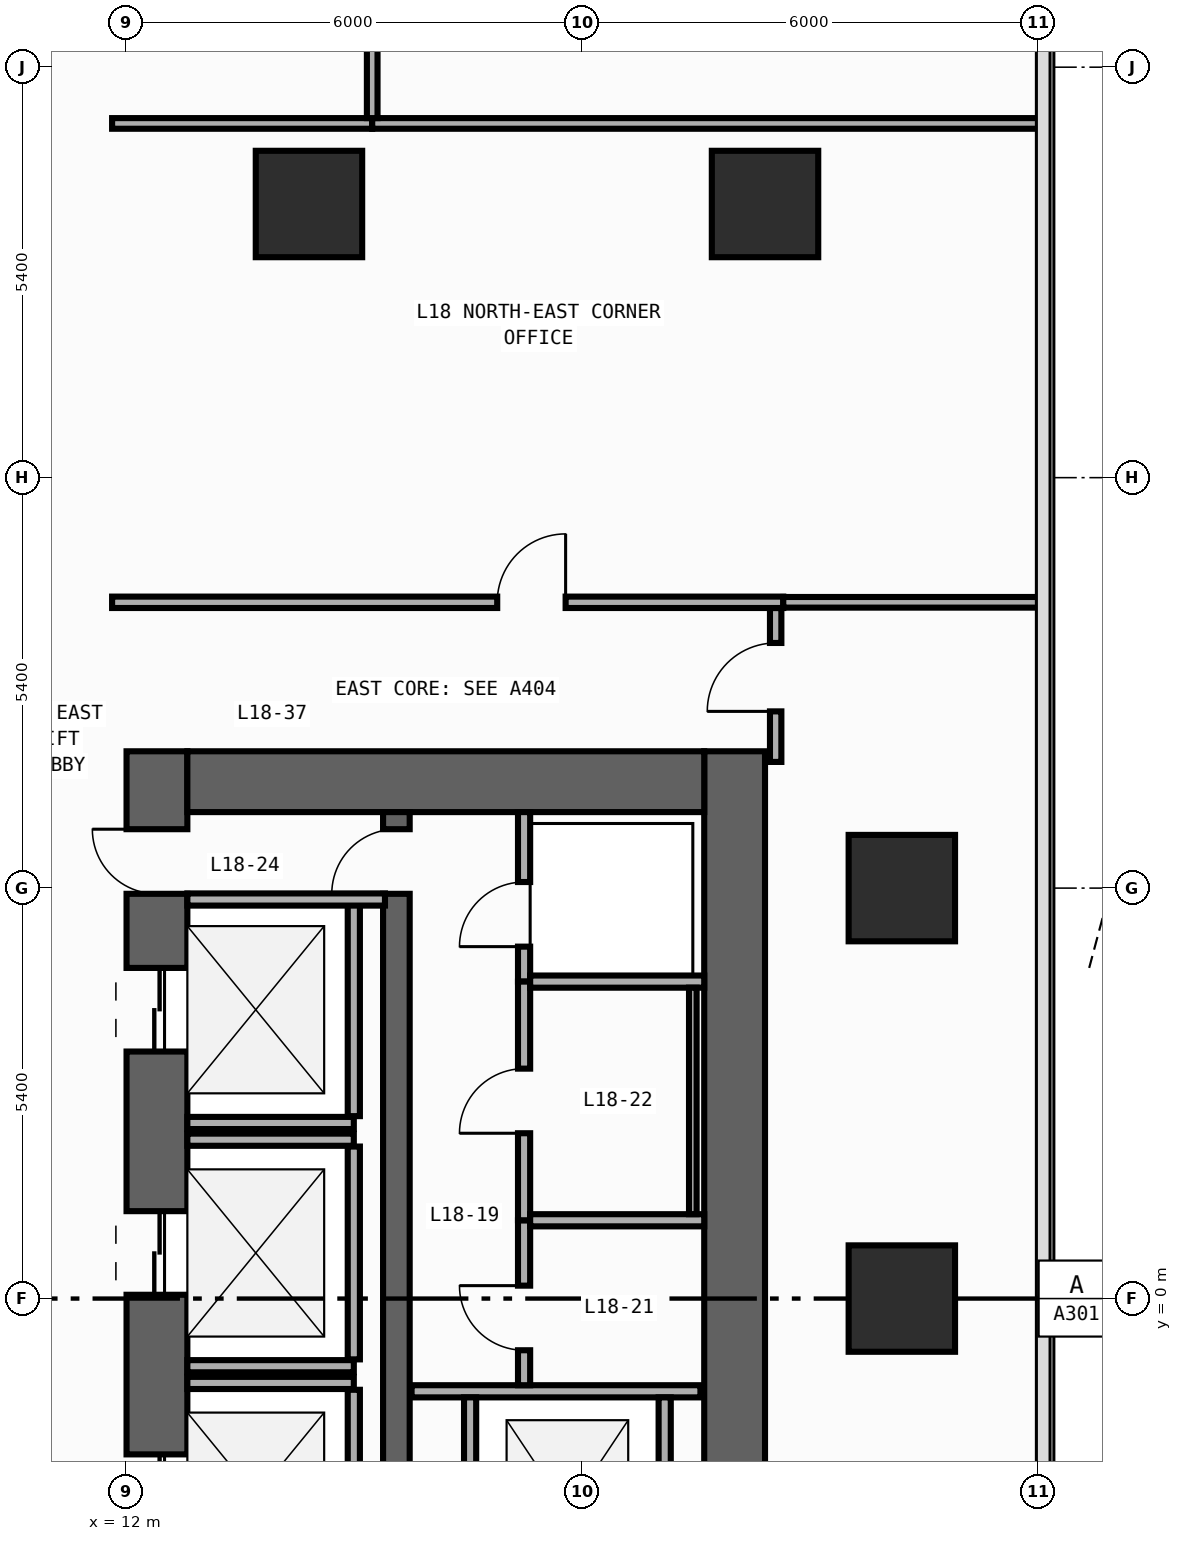
"""IFC4 building model, lengths in metres.
Left out: names, types, materials, properties, quantities, classifications, styles, units other than length and angle.
Written with IfcOpenShell. Run it as: python <this file> out.ifc"""

import sys

from ifc_helpers import new_model, si_unit, direction, frame, frame_2d, origin, origin_2d, place, context, subcontext, project, spatial, rectangle, extrude, element, fill, save


model = new_model("IFC4")
c1 = context("Model", 3, precision=1e-05, world=origin(), true_north=direction((0.0, 1.0)))
c2 = subcontext(c1, "Body", "Model", "MODEL_VIEW")
j1 = project(units=[si_unit("LENGTHUNIT", "METRE"), si_unit("PLANEANGLEUNIT", "RADIAN")], contexts=[c1])
p1 = place(None, origin())
s1 = spatial("IfcSite", under=j1, at=p1, CompositionType="ELEMENT")
p2 = place(p1, origin())
s2 = spatial("IfcBuilding", under=s1, at=p2, CompositionType="ELEMENT")
p3 = place(p2, frame((0.0, 0.0, 76.4)))
s3 = spatial("IfcBuildingStorey", under=s2, at=p3, CompositionType="ELEMENT", Elevation=76.4)
p4 = place(p3, frame((12.4, -19.8, 0.0), z_axis=(0.0, 0.0, 1.0), x_axis=(0.0, 1.0, 0.0)))
e1 = element("IfcWall", 1, at=p4, inside=s3, PredefinedType="SHEAR", context=c2, shape_type="SweptSolid", body=[
    extrude(rectangle(XDim=27.0, YDim=0.8, at=frame_2d((13.5, 0.0))), origin(), (0.0, 0.0, 1.0), 3.94),
])
p5 = place(p4, frame((23.05, 0.0, 0.0)))
e2 = element("IfcOpeningElement", 2, at=p5, cuts=e1, PredefinedType="OPENING", context=c2, shape_type="SweptSolid", body=[
    extrude(rectangle(XDim=1.1, YDim=2.2, at=frame_2d((0.55, 1.1))), frame((0.0, 0.41, 0.0), z_axis=(0.0, -1.0, 0.0), x_axis=(1.0, 0.0, 0.0)), (0.0, 0.0, 1.0), 0.82),
])
p6 = place(p4, frame((19.85, 0.0, 0.0)))
e3 = element("IfcOpeningElement", 3, at=p6, cuts=e1, PredefinedType="OPENING", context=c2, shape_type="SweptSolid", body=[
    extrude(rectangle(XDim=1.1, YDim=2.2, at=frame_2d((0.55, 1.1))), frame((0.0, 0.41, 0.0), z_axis=(0.0, -1.0, 0.0), x_axis=(1.0, 0.0, 0.0)), (0.0, 0.0, 1.0), 0.82),
])
p7 = place(p4, frame((16.65, 0.0, 0.0)))
e4 = element("IfcOpeningElement", 4, at=p7, cuts=e1, PredefinedType="OPENING", context=c2, shape_type="SweptSolid", body=[
    extrude(rectangle(XDim=1.1, YDim=2.2, at=frame_2d((0.55, 1.1))), frame((0.0, 0.41, 0.0), z_axis=(0.0, -1.0, 0.0), x_axis=(1.0, 0.0, 0.0)), (0.0, 0.0, 1.0), 0.82),
])
p8 = place(p4, frame((6.275, 0.0, 0.0)))
e5 = element("IfcOpeningElement", 5, at=p8, cuts=e1, PredefinedType="OPENING", context=c2, shape_type="SweptSolid", body=[
    extrude(rectangle(XDim=0.85, YDim=2.1, at=frame_2d((0.425, 1.05))), frame((0.0, 0.41, 0.0), z_axis=(0.0, -1.0, 0.0), x_axis=(1.0, 0.0, 0.0)), (0.0, 0.0, 1.0), 0.82),
])
p9 = place(p4, frame((8.575, 0.0, 0.0)))
e6 = element("IfcOpeningElement", 6, at=p9, cuts=e1, PredefinedType="OPENING", context=c2, shape_type="SweptSolid", body=[
    extrude(rectangle(XDim=0.85, YDim=2.1, at=frame_2d((0.425, 1.05))), frame((0.0, 0.41, 0.0), z_axis=(0.0, -1.0, 0.0), x_axis=(1.0, 0.0, 0.0)), (0.0, 0.0, 1.0), 0.82),
])
p10 = place(p4, frame((10.675, 0.0, 0.0)))
e7 = element("IfcOpeningElement", 7, at=p10, cuts=e1, PredefinedType="OPENING", context=c2, shape_type="SweptSolid", body=[
    extrude(rectangle(XDim=0.85, YDim=2.1, at=frame_2d((0.425, 1.05))), frame((0.0, 0.41, 0.0), z_axis=(0.0, -1.0, 0.0), x_axis=(1.0, 0.0, 0.0)), (0.0, 0.0, 1.0), 0.82),
])
p11 = place(p4, frame((12.725, 0.0, 0.0)))
e8 = element("IfcOpeningElement", 8, at=p11, cuts=e1, PredefinedType="OPENING", context=c2, shape_type="SweptSolid", body=[
    extrude(rectangle(XDim=1.15, YDim=2.2, at=frame_2d((0.575, 1.1))), frame((0.0, 0.41, 0.0), z_axis=(0.0, -1.0, 0.0), x_axis=(1.0, 0.0, 0.0)), (0.0, 0.0, 1.0), 0.82),
])
p12 = place(p4, frame((25.125, 0.0, 0.0)))
e9 = element("IfcOpeningElement", 9, at=p12, cuts=e1, PredefinedType="OPENING", context=c2, shape_type="SweptSolid", body=[
    extrude(rectangle(XDim=0.85, YDim=2.1, at=frame_2d((0.425, 1.05))), frame((0.0, 0.41, 0.0), z_axis=(0.0, -1.0, 0.0), x_axis=(1.0, 0.0, 0.0)), (0.0, 0.0, 1.0), 0.82),
])
p13 = place(p3, frame((20.0, -19.8, 0.0), z_axis=(0.0, 0.0, 1.0), x_axis=(0.0, 1.0, 0.0)))
e10 = element("IfcWall", 10, at=p13, inside=s3, PredefinedType="SHEAR", context=c2, shape_type="SweptSolid", body=[
    extrude(rectangle(XDim=27.0, YDim=0.8, at=frame_2d((13.5, 0.0))), origin(), (0.0, 0.0, 1.0), 3.94),
])
p14 = place(p3, frame((12.8, 6.8, 0.0), z_axis=(0.0, 0.0, 1.0), x_axis=(1.0, 0.0, 0.0)))
e11 = element("IfcWall", 11, at=p14, inside=s3, PredefinedType="SHEAR", context=c2, shape_type="SweptSolid", body=[
    extrude(rectangle(XDim=6.8, YDim=0.8, at=frame_2d((3.4, 0.0))), origin(), (0.0, 0.0, 1.0), 3.94),
])
p15 = place(p3, frame((15.55, -19.0, 0.0), z_axis=(0.0, 0.0, 1.0), x_axis=(0.0, 1.0, 0.0)))
e12 = element("IfcWall", 12, at=p15, inside=s3, PredefinedType="SHEAR", context=c2, shape_type="SweptSolid", body=[
    extrude(rectangle(XDim=25.4, YDim=0.35, at=frame_2d((12.7, 0.0))), origin(), (0.0, 0.0, 1.0), 3.94),
])
p16 = place(p15, frame((11.925, 0.0, 0.0)))
e13 = element("IfcOpeningElement", 13, at=p16, cuts=e12, PredefinedType="OPENING", context=c2, shape_type="SweptSolid", body=[
    extrude(rectangle(XDim=1.15, YDim=2.2, at=frame_2d((0.575, 1.1))), frame((0.0, 0.185, 0.0), z_axis=(0.0, -1.0, 0.0), x_axis=(1.0, 0.0, 0.0)), (0.0, 0.0, 1.0), 0.37),
])
p17 = place(p15, frame((24.325, 0.0, 0.0)))
e14 = element("IfcOpeningElement", 14, at=p17, cuts=e12, PredefinedType="OPENING", context=c2, shape_type="SweptSolid", body=[
    extrude(rectangle(XDim=0.85, YDim=2.1, at=frame_2d((0.425, 1.05))), frame((0.0, 0.185, 0.0), z_axis=(0.0, -1.0, 0.0), x_axis=(1.0, 0.0, 0.0)), (0.0, 0.0, 1.0), 0.37),
])
for number, where, z_axis, x_axis in (
    (15, (20.4, 14.4, 0.0), (0.0, 0.0, 1.0), (1.0, 0.0, 0.0)),
    (16, (14.4, 14.4, 0.0), (0.0, 0.0, 1.0), (1.0, 0.0, 0.0)),
    (17, (22.2, 0.0, 0.0), (0.0, 0.0, 1.0), (1.0, 0.0, 0.0)),
    (18, (22.2, 5.4, 0.0), (0.0, 0.0, 1.0), (1.0, 0.0, 0.0)),
):
    element("IfcColumn", number, at=place(p3, frame(where, z_axis=z_axis, x_axis=x_axis)), inside=s3, PredefinedType="COLUMN", context=c2, shape_type="SweptSolid", body=[
        extrude(rectangle(XDim=1.4, YDim=1.4, at=origin_2d()), origin(), (0.0, 0.0, 1.0), 4.2),
    ])
p18 = place(p3, frame((12.8, 2.31, 0.0), z_axis=(0.0, 0.0, 1.0), x_axis=(1.0, 0.0, 0.0)))
e19 = element("IfcWall", 19, at=p18, inside=s3, PredefinedType="STANDARD", context=c2, shape_type="SweptSolid", body=[
    extrude(rectangle(XDim=2.19, YDim=0.16, at=frame_2d((1.095, 0.0))), origin(), (0.0, 0.0, 1.0), 3.94),
])
p19 = place(p3, frame((14.99, 2.4, 0.0), z_axis=(0.0, 0.0, 1.0), x_axis=(0.0, 1.0, 0.0)))
e20 = element("IfcWall", 20, at=p19, inside=s3, PredefinedType="STANDARD", context=c2, shape_type="SweptSolid", body=[
    extrude(rectangle(XDim=2.8, YDim=0.16, at=frame_2d((1.4, 0.0))), origin(), (0.0, 0.0, 1.0), 3.94),
])
for number, where, z_axis, x_axis in (
    (21, (12.8, -0.89, 0.0), (0.0, 0.0, 1.0), (1.0, 0.0, 0.0)),
    (22, (12.8, 2.09, 0.0), (0.0, 0.0, 1.0), (1.0, 0.0, 0.0)),
):
    element("IfcWall", number, at=place(p3, frame(where, z_axis=z_axis, x_axis=x_axis)), inside=s3, PredefinedType="STANDARD", context=c2, shape_type="SweptSolid", body=[
        extrude(rectangle(XDim=2.19, YDim=0.16, at=frame_2d((1.095, 0.0))), origin(), (0.0, 0.0, 1.0), 3.94),
    ])
p20 = place(p3, frame((14.99, -0.8, 0.0), z_axis=(0.0, 0.0, 1.0), x_axis=(0.0, 1.0, 0.0)))
e23 = element("IfcWall", 23, at=p20, inside=s3, PredefinedType="STANDARD", context=c2, shape_type="SweptSolid", body=[
    extrude(rectangle(XDim=2.8, YDim=0.16, at=frame_2d((1.4, 0.0))), origin(), (0.0, 0.0, 1.0), 3.94),
])
p21 = place(p3, frame((12.8, -1.11, 0.0), z_axis=(0.0, 0.0, 1.0), x_axis=(1.0, 0.0, 0.0)))
e24 = element("IfcWall", 24, at=p21, inside=s3, PredefinedType="STANDARD", context=c2, shape_type="SweptSolid", body=[
    extrude(rectangle(XDim=2.19, YDim=0.16, at=frame_2d((1.095, 0.0))), origin(), (0.0, 0.0, 1.0), 3.94),
])
p22 = place(p3, frame((14.99, -4.0, 0.0), z_axis=(0.0, 0.0, 1.0), x_axis=(0.0, 1.0, 0.0)))
e25 = element("IfcWall", 25, at=p22, inside=s3, PredefinedType="STANDARD", context=c2, shape_type="SweptSolid", body=[
    extrude(rectangle(XDim=2.8, YDim=0.16, at=frame_2d((1.4, 0.0))), origin(), (0.0, 0.0, 1.0), 3.94),
])
p23 = place(p3, frame((15.75, -1.22, 0.0), z_axis=(0.0, 0.0, 1.0), x_axis=(1.0, 0.0, 0.0)))
e26 = element("IfcWall", 26, at=p23, inside=s3, PredefinedType="STANDARD", context=c2, shape_type="SweptSolid", body=[
    extrude(rectangle(XDim=3.8, YDim=0.16, at=frame_2d((1.9, 0.0))), origin(), (0.0, 0.0, 1.0), 3.94),
])
for number, where, z_axis, x_axis in (
    (27, (16.52, -4.28, 0.0), (0.0, 0.0, 1.0), (0.0, 1.0, 0.0)),
    (28, (19.08, -4.28, 0.0), (0.0, 0.0, 1.0), (0.0, 1.0, 0.0)),
):
    element("IfcWall", number, at=place(p3, frame(where, z_axis=z_axis, x_axis=x_axis)), inside=s3, PredefinedType="STANDARD", context=c2, shape_type="SweptSolid", body=[
        extrude(rectangle(XDim=2.98, YDim=0.16, at=frame_2d((1.49, 0.0))), origin(), (0.0, 0.0, 1.0), 3.94),
    ])
p24 = place(p3, frame((12.8, 5.25, 0.0), z_axis=(0.0, 0.0, 1.0), x_axis=(1.0, 0.0, 0.0)))
e29 = element("IfcWall", 29, at=p24, inside=s3, PredefinedType="STANDARD", context=c2, shape_type="SweptSolid", body=[
    extrude(rectangle(XDim=2.6, YDim=0.16, at=frame_2d((1.3, 0.0))), origin(), (0.0, 0.0, 1.0), 3.94),
])
p25 = place(p3, frame((17.23, 4.17, 0.0), z_axis=(0.0, 0.0, 1.0), x_axis=(0.0, 1.0, 0.0)))
e30 = element("IfcWall", 30, at=p25, inside=s3, PredefinedType="PARTITIONING", context=c2, shape_type="SweptSolid", body=[
    extrude(rectangle(XDim=2.23, YDim=0.16, at=frame_2d((1.115, 0.0))), origin(), (0.0, 0.0, 1.0), 3.94),
])
p26 = place(p25, frame((0.46, 0.0, 0.0)))
e31 = element("IfcOpeningElement", 31, at=p26, cuts=e30, PredefinedType="OPENING", context=c2, shape_type="SweptSolid", body=[
    extrude(rectangle(XDim=0.85, YDim=2.1, at=frame_2d((0.425, 1.05))), frame((0.0, 0.09, 0.0), z_axis=(0.0, -1.0, 0.0), x_axis=(1.0, 0.0, 0.0)), (0.0, 0.0, 1.0), 0.18),
])
p27 = place(p3, frame((17.23, -1.14, 0.0), z_axis=(0.0, 0.0, 1.0), x_axis=(0.0, 1.0, 0.0)))
e32 = element("IfcWall", 32, at=p27, inside=s3, PredefinedType="PARTITIONING", context=c2, shape_type="SweptSolid", body=[
    extrude(rectangle(XDim=2.17, YDim=0.16, at=frame_2d((1.085, 0.0))), origin(), (0.0, 0.0, 1.0), 3.94),
])
p28 = place(p27, frame((0.46, 0.0, 0.0)))
e33 = element("IfcOpeningElement", 33, at=p28, cuts=e32, PredefinedType="OPENING", context=c2, shape_type="SweptSolid", body=[
    extrude(rectangle(XDim=0.85, YDim=2.1, at=frame_2d((0.425, 1.05))), frame((0.0, 0.09, 0.0), z_axis=(0.0, -1.0, 0.0), x_axis=(1.0, 0.0, 0.0)), (0.0, 0.0, 1.0), 0.18),
])
p29 = place(p3, frame((17.23, 1.03, 0.0), z_axis=(0.0, 0.0, 1.0), x_axis=(0.0, 1.0, 0.0)))
e34 = element("IfcWall", 34, at=p29, inside=s3, PredefinedType="PARTITIONING", context=c2, shape_type="SweptSolid", body=[
    extrude(rectangle(XDim=3.14, YDim=0.16, at=frame_2d((1.57, 0.0))), origin(), (0.0, 0.0, 1.0), 3.94),
])
p30 = place(p29, frame((1.145, 0.0, 0.0)))
e35 = element("IfcOpeningElement", 35, at=p30, cuts=e34, PredefinedType="OPENING", context=c2, shape_type="SweptSolid", body=[
    extrude(rectangle(XDim=0.85, YDim=2.1, at=frame_2d((0.425, 1.05))), frame((0.0, 0.09, 0.0), z_axis=(0.0, -1.0, 0.0), x_axis=(1.0, 0.0, 0.0)), (0.0, 0.0, 1.0), 0.18),
])
for number, where, z_axis, x_axis in (
    (36, (17.31, 4.17, 0.0), (0.0, 0.0, 1.0), (1.0, 0.0, 0.0)),
    (37, (17.31, 1.03, 0.0), (0.0, 0.0, 1.0), (1.0, 0.0, 0.0)),
):
    element("IfcWall", number, at=place(p3, frame(where, z_axis=z_axis, x_axis=x_axis)), inside=s3, PredefinedType="PARTITIONING", context=c2, shape_type="SweptSolid", body=[
        extrude(rectangle(XDim=2.29, YDim=0.16, at=frame_2d((1.145, 0.0))), origin(), (0.0, 0.0, 1.0), 3.94),
    ])
p31 = place(p3, frame((20.54, 7.06, 0.0), z_axis=(0.0, 0.0, 1.0), x_axis=(0.0, 1.0, 0.0)))
e38 = element("IfcWall", 38, at=p31, inside=s3, PredefinedType="PARTITIONING", context=c2, shape_type="SweptSolid", body=[
    extrude(rectangle(XDim=2.025, YDim=0.15, at=frame_2d((1.012, 0.0))), origin(), (0.0, 0.0, 1.0), 3.94),
])
p32 = place(p31, frame((0.665, 0.0, 0.0)))
e39 = element("IfcOpeningElement", 39, at=p32, cuts=e38, PredefinedType="OPENING", context=c2, shape_type="SweptSolid", body=[
    extrude(rectangle(XDim=0.9, YDim=2.15, at=frame_2d((0.45, 1.075))), frame((0.0, 0.085, 0.0), z_axis=(0.0, -1.0, 0.0), x_axis=(1.0, 0.0, 0.0)), (0.0, 0.0, 1.0), 0.17),
])
p33 = place(p3, frame((11.81, 9.16, 0.0), z_axis=(0.0, 0.0, 1.0), x_axis=(1.0, 0.0, 0.0)))
e40 = element("IfcWall", 40, at=p33, inside=s3, PredefinedType="PARTITIONING", context=c2, shape_type="SweptSolid", body=[
    extrude(rectangle(XDim=8.83, YDim=0.15, at=frame_2d((4.415, 0.0))), origin(), (0.0, 0.0, 1.0), 3.94),
])
p34 = place(p33, frame((5.067, 0.0, 0.0)))
e41 = element("IfcOpeningElement", 41, at=p34, cuts=e40, PredefinedType="OPENING", context=c2, shape_type="SweptSolid", body=[
    extrude(rectangle(XDim=0.9, YDim=2.15, at=frame_2d((0.45, 1.075))), frame((0.0, 0.085, 0.0), z_axis=(0.0, -1.0, 0.0), x_axis=(1.0, 0.0, 0.0)), (0.0, 0.0, 1.0), 0.17),
])
p35 = place(p3, frame((20.64, 9.16, 0.0), z_axis=(0.0, 0.0, 1.0), x_axis=(1.0, 0.0, 0.0)))
e42 = element("IfcWall", 42, at=p35, inside=s3, PredefinedType="PARTITIONING", context=c2, shape_type="SweptSolid", body=[
    extrude(rectangle(XDim=3.415, YDim=0.14, at=frame_2d((1.708, 0.0))), origin(), (0.0, 0.0, 1.0), 3.94),
])
p36 = place(p3, frame((11.81, 15.46, 0.0), z_axis=(0.0, 0.0, 1.0), x_axis=(1.0, 0.0, 0.0)))
e43 = element("IfcWall", 43, at=p36, inside=s3, PredefinedType="PARTITIONING", context=c2, shape_type="SweptSolid", body=[
    extrude(rectangle(XDim=3.422, YDim=0.14, at=frame_2d((1.711, 0.0))), origin(), (0.0, 0.0, 1.0), 3.94),
])
p37 = place(p3, frame((15.232, 15.46, 0.0), z_axis=(0.0, 0.0, 1.0), x_axis=(1.0, 0.0, 0.0)))
e44 = element("IfcWall", 44, at=p37, inside=s3, PredefinedType="PARTITIONING", context=c2, shape_type="SweptSolid", body=[
    extrude(rectangle(XDim=8.823, YDim=0.14, at=frame_2d((4.412, 0.0))), origin(), (0.0, 0.0, 1.0), 3.94),
])
p38 = place(p3, frame((15.232, 15.53, 0.0), z_axis=(0.0, 0.0, 1.0), x_axis=(0.0, 1.0, 0.0)))
e45 = element("IfcWall", 45, at=p38, inside=s3, PredefinedType="PARTITIONING", context=c2, shape_type="SweptSolid", body=[
    extrude(rectangle(XDim=11.325, YDim=0.14, at=frame_2d((5.663, 0.0))), origin(), (0.0, 0.0, 1.0), 3.94),
])
p39 = place(p38, frame((3.713, 0.0, 0.0)))
e46 = element("IfcOpeningElement", 46, at=p39, cuts=e45, PredefinedType="OPENING", context=c2, shape_type="SweptSolid", body=[
    extrude(rectangle(XDim=0.85, YDim=2.1, at=frame_2d((0.425, 1.05))), frame((0.0, 0.08, 0.0), z_axis=(0.0, -1.0, 0.0), x_axis=(1.0, 0.0, 0.0)), (0.0, 0.0, 1.0), 0.16),
])
p40 = place(p3, frame((19.45, 4.09, 0.0), z_axis=(0.0, 0.0, 1.0), x_axis=(0.0, -1.0, 0.0)))
e47 = element("IfcWall", 47, at=p40, inside=s3, PredefinedType="PARTITIONING", context=c2, shape_type="SweptSolid", body=[
    extrude(rectangle(XDim=2.98, YDim=0.1, at=frame_2d((1.49, 0.0))), origin(), (0.0, 0.0, 1.0), 3.94),
])
p41 = place(p5, origin())
e48 = element("IfcDoor", 48, at=p41, inside=s3, OperationType="DOUBLE_DOOR_SLIDING", PredefinedType="DOOR", context=c2, shape_type="SweptSolid", body=[
    extrude(rectangle(XDim=1.1, YDim=2.2, at=frame_2d((0.55, 1.1))), frame((0.0, 0.025, 0.0), z_axis=(0.0, -1.0, 0.0), x_axis=(1.0, 0.0, 0.0)), (0.0, 0.0, 1.0), 0.05),
])
fill(e2, e48)
p42 = place(p6, origin())
e49 = element("IfcDoor", 49, at=p42, inside=s3, OperationType="DOUBLE_DOOR_SLIDING", PredefinedType="DOOR", context=c2, shape_type="SweptSolid", body=[
    extrude(rectangle(XDim=1.1, YDim=2.2, at=frame_2d((0.55, 1.1))), frame((0.0, 0.025, 0.0), z_axis=(0.0, -1.0, 0.0), x_axis=(1.0, 0.0, 0.0)), (0.0, 0.0, 1.0), 0.05),
])
fill(e3, e49)
p43 = place(p7, origin())
e50 = element("IfcDoor", 50, at=p43, inside=s3, OperationType="DOUBLE_DOOR_SLIDING", PredefinedType="DOOR", context=c2, shape_type="SweptSolid", body=[
    extrude(rectangle(XDim=1.1, YDim=2.2, at=frame_2d((0.55, 1.1))), frame((0.0, 0.025, 0.0), z_axis=(0.0, -1.0, 0.0), x_axis=(1.0, 0.0, 0.0)), (0.0, 0.0, 1.0), 0.05),
])
fill(e4, e50)
p44 = place(p12, origin())
e51 = element("IfcDoor", 51, at=p44, inside=s3, OperationType="SINGLE_SWING_RIGHT", PredefinedType="DOOR", context=c2, shape_type="SweptSolid", body=[
    extrude(rectangle(XDim=0.85, YDim=2.1, at=frame_2d((0.425, 1.05))), frame((0.0, 0.025, 0.0), z_axis=(0.0, -1.0, 0.0), x_axis=(1.0, 0.0, 0.0)), (0.0, 0.0, 1.0), 0.05),
])
fill(e9, e51)
p45 = place(p17, origin())
e52 = element("IfcDoor", 52, at=p45, inside=s3, OperationType="SINGLE_SWING_LEFT", PredefinedType="DOOR", context=c2, shape_type="SweptSolid", body=[
    extrude(rectangle(XDim=0.85, YDim=2.1, at=frame_2d((0.425, 1.05))), frame((0.0, 0.025, 0.0), z_axis=(0.0, -1.0, 0.0), x_axis=(1.0, 0.0, 0.0)), (0.0, 0.0, 1.0), 0.05),
])
fill(e14, e52)
p46 = place(p26, origin())
e53 = element("IfcDoor", 53, at=p46, inside=s3, OperationType="SINGLE_SWING_LEFT", PredefinedType="DOOR", context=c2, shape_type="SweptSolid", body=[
    extrude(rectangle(XDim=0.85, YDim=2.1, at=frame_2d((0.425, 1.05))), frame((0.0, 0.025, 0.0), z_axis=(0.0, -1.0, 0.0), x_axis=(1.0, 0.0, 0.0)), (0.0, 0.0, 1.0), 0.05),
])
fill(e31, e53)
p47 = place(p28, origin())
e54 = element("IfcDoor", 54, at=p47, inside=s3, OperationType="SINGLE_SWING_RIGHT", PredefinedType="DOOR", context=c2, shape_type="SweptSolid", body=[
    extrude(rectangle(XDim=0.85, YDim=2.1, at=frame_2d((0.425, 1.05))), frame((0.0, 0.025, 0.0), z_axis=(0.0, -1.0, 0.0), x_axis=(1.0, 0.0, 0.0)), (0.0, 0.0, 1.0), 0.05),
])
fill(e33, e54)
p48 = place(p30, origin())
e55 = element("IfcDoor", 55, at=p48, inside=s3, OperationType="SINGLE_SWING_LEFT", PredefinedType="DOOR", context=c2, shape_type="SweptSolid", body=[
    extrude(rectangle(XDim=0.85, YDim=2.1, at=frame_2d((0.425, 1.05))), frame((0.0, 0.025, 0.0), z_axis=(0.0, -1.0, 0.0), x_axis=(1.0, 0.0, 0.0)), (0.0, 0.0, 1.0), 0.05),
])
fill(e35, e55)
p49 = place(p32, origin())
e56 = element("IfcDoor", 56, at=p49, inside=s3, OperationType="SINGLE_SWING_LEFT", PredefinedType="DOOR", context=c2, shape_type="SweptSolid", body=[
    extrude(rectangle(XDim=0.9, YDim=2.15, at=frame_2d((0.45, 1.075))), frame((0.0, 0.025, 0.0), z_axis=(0.0, -1.0, 0.0), x_axis=(1.0, 0.0, 0.0)), (0.0, 0.0, 1.0), 0.05),
])
fill(e39, e56)
p50 = place(p34, origin())
e57 = element("IfcDoor", 57, at=p50, inside=s3, OperationType="SINGLE_SWING_RIGHT", PredefinedType="DOOR", context=c2, shape_type="SweptSolid", body=[
    extrude(rectangle(XDim=0.9, YDim=2.15, at=frame_2d((0.45, 1.075))), frame((0.0, 0.025, 0.0), z_axis=(0.0, -1.0, 0.0), x_axis=(1.0, 0.0, 0.0)), (0.0, 0.0, 1.0), 0.05),
])
fill(e41, e57)
save(model, sys.argv[1])
